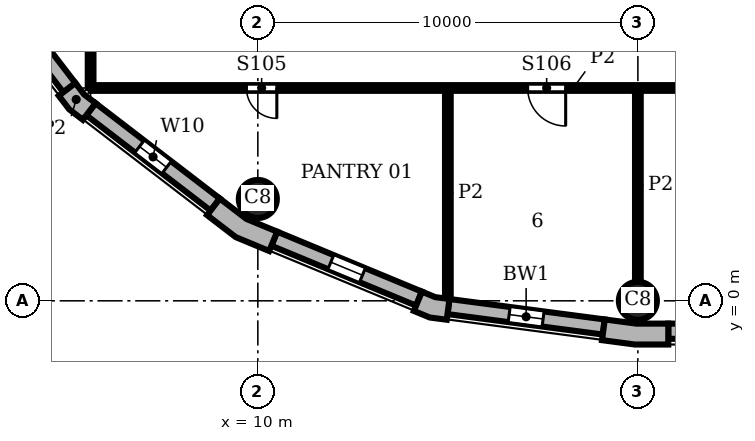
"""IFC4 building model, lengths in metres.
Left out: names, types, materials, properties, quantities, classifications, styles, units other than length and angle.
Written with IfcOpenShell. Run it as: python <this file> out.ifc"""

import sys

from ifc_helpers import new_model, si_unit, direction, frame, frame_2d, origin, origin_2d, place, context, subcontext, project, spatial, polyline, rectangle, circle, outline, extrude, element, fill, save


model = new_model("IFC4")
c1 = context("Model", 3, precision=1e-05, world=origin(), true_north=direction((0.0, 1.0)))
c2 = subcontext(c1, "Body", "Model", "MODEL_VIEW")
j1 = project(units=[si_unit("LENGTHUNIT", "METRE"), si_unit("PLANEANGLEUNIT", "RADIAN")], contexts=[c1])
p1 = place(None, origin())
s1 = spatial("IfcSite", under=j1, at=p1, CompositionType="ELEMENT")
p2 = place(p1, origin())
s2 = spatial("IfcBuilding", under=s1, at=p2, CompositionType="ELEMENT")
p3 = place(p2, frame((0.0, 0.0, 126.3)))
s3 = spatial("IfcBuildingStorey", under=s2, at=p3, CompositionType="ELEMENT", Elevation=126.3)
for number, where, z_axis, x_axis in (
    (1, (20.0, 0.0, 0.0), (0.0, 0.0, 1.0), (1.0, 0.0, 0.0)),
    (2, (10.0, 2.679, 0.0), (0.0, 0.0, 1.0), (1.0, 0.0, 0.0)),
):
    element("IfcColumn", number, at=place(p3, frame(where, z_axis=z_axis, x_axis=x_axis)), inside=s3, PredefinedType="COLUMN", context=c2, shape_type="SweptSolid", body=[
        extrude(circle(Radius=0.5, at=origin_2d()), origin(), (0.0, 0.0, 1.0), 5.4),
    ])
p4 = place(p3, origin())
e3 = element("IfcWall", 3, at=p4, inside=s3, PredefinedType="SOLIDWALL", context=c2, shape_type="SweptSolid", body=[
    extrude(outline(polyline([(19.076, -0.887), (19.057, -1.036), (19.925, -1.15), (20.8, -1.15), (20.8, -1.0), (20.8, -0.6), (19.961, -0.6), (19.128, -0.49), (19.076, -0.887)])), origin(), (0.0, 0.0, 1.0), 5.4),
])
e4 = element("IfcWall", 4, at=p4, inside=s3, PredefinedType="SOLIDWALL", context=c2, shape_type="SweptSolid", body=[
    extrude(outline(polyline([(4.882, 5.487), (4.763, 5.396), (5.038, 5.038), (5.396, 4.763), (5.487, 4.882), (5.731, 5.199), (5.43, 5.43), (5.199, 5.731), (4.882, 5.487)])), origin(), (0.0, 0.0, 1.0), 5.4),
])
e5 = element("IfcWall", 5, at=p4, inside=s3, PredefinedType="SOLIDWALL", context=c2, shape_type="SweptSolid", body=[
    extrude(outline(polyline([(8.757, 2.373), (8.665, 2.254), (9.42, 1.675), (10.299, 1.311), (10.356, 1.449), (10.51, 1.819), (9.698, 2.155), (9.0, 2.69), (8.757, 2.373)])), origin(), (0.0, 0.0, 1.0), 5.4),
])
e6 = element("IfcWall", 6, at=p4, inside=s3, PredefinedType="SOLIDWALL", context=c2, shape_type="SweptSolid", body=[
    extrude(outline(polyline([(14.164, -0.128), (14.106, -0.266), (14.523, -0.439), (14.971, -0.498), (14.99, -0.349), (15.043, 0.047), (14.667, 0.097), (14.317, 0.242), (14.164, -0.128)])), origin(), (0.0, 0.0, 1.0), 5.4),
])
p5 = place(p3, frame((20.8, -0.8, 0.0), z_axis=(0.0, 0.0, 1.0), x_axis=(1.0, 0.0, 0.0)))
e7 = element("IfcWall", 7, at=p5, inside=s3, PredefinedType="SOLIDWALL", context=c2, shape_type="SweptSolid", body=[
    extrude(rectangle(XDim=38.4, YDim=0.4, at=frame_2d((19.2, 0.0))), origin(), (0.0, 0.0, 1.0), 5.4),
])
p6 = place(p5, frame((3.75, 0.0, 0.9)))
e8 = element("IfcOpeningElement", 8, at=p6, cuts=e7, PredefinedType="OPENING", context=c2, shape_type="SweptSolid", body=[
    extrude(rectangle(XDim=0.9, YDim=3.4, at=frame_2d((0.45, 1.7))), frame((0.0, 0.21, 0.0), z_axis=(0.0, -1.0, 0.0), x_axis=(1.0, 0.0, 0.0)), (0.0, 0.0, 1.0), 0.42),
])
p7 = place(p5, frame((13.75, 0.0, 0.9)))
e9 = element("IfcOpeningElement", 9, at=p7, cuts=e7, PredefinedType="OPENING", context=c2, shape_type="SweptSolid", body=[
    extrude(rectangle(XDim=0.9, YDim=3.4, at=frame_2d((0.45, 1.7))), frame((0.0, 0.21, 0.0), z_axis=(0.0, -1.0, 0.0), x_axis=(1.0, 0.0, 0.0)), (0.0, 0.0, 1.0), 0.42),
])
p8 = place(p5, frame((23.75, 0.0, 0.9)))
e10 = element("IfcOpeningElement", 10, at=p8, cuts=e7, PredefinedType="OPENING", context=c2, shape_type="SweptSolid", body=[
    extrude(rectangle(XDim=0.9, YDim=3.4, at=frame_2d((0.45, 1.7))), frame((0.0, 0.21, 0.0), z_axis=(0.0, -1.0, 0.0), x_axis=(1.0, 0.0, 0.0)), (0.0, 0.0, 1.0), 0.42),
])
p9 = place(p5, frame((33.75, 0.0, 0.9)))
e11 = element("IfcOpeningElement", 11, at=p9, cuts=e7, PredefinedType="OPENING", context=c2, shape_type="SweptSolid", body=[
    extrude(rectangle(XDim=0.9, YDim=3.4, at=frame_2d((0.45, 1.7))), frame((0.0, 0.21, 0.0), z_axis=(0.0, -1.0, 0.0), x_axis=(1.0, 0.0, 0.0)), (0.0, 0.0, 1.0), 0.42),
])
p10 = place(p3, frame((2.532, 8.878, 0.0), z_axis=(0.0, 0.0, 1.0), x_axis=(0.608759824817, -0.793354571229, 0.0)))
e12 = element("IfcWall", 12, at=p10, inside=s3, PredefinedType="SOLIDWALL", context=c2, shape_type="SweptSolid", body=[
    extrude(rectangle(XDim=4.121, YDim=0.4, at=frame_2d((2.061, 0.0))), origin(), (0.0, 0.0, 1.0), 5.4),
])
p11 = place(p10, frame((1.611, 0.0, 0.9)))
e13 = element("IfcOpeningElement", 13, at=p11, cuts=e12, PredefinedType="OPENING", context=c2, shape_type="SweptSolid", body=[
    extrude(rectangle(XDim=0.9, YDim=3.4, at=frame_2d((0.45, 1.7))), frame((0.0, 0.21, 0.0), z_axis=(0.0, -1.0, 0.0), x_axis=(1.0, 0.0, 0.0)), (0.0, 0.0, 1.0), 0.42),
])
p12 = place(p3, frame((5.609, 5.041, 0.0), z_axis=(0.0, 0.0, 1.0), x_axis=(0.793354571229, -0.608759824817, 0.0)))
e14 = element("IfcWall", 14, at=p12, inside=s3, PredefinedType="SOLIDWALL", context=c2, shape_type="SweptSolid", body=[
    extrude(rectangle(XDim=4.121, YDim=0.4, at=frame_2d((2.061, 0.0))), origin(), (0.0, 0.0, 1.0), 5.4),
])
p13 = place(p12, frame((1.611, 0.0, 0.9)))
e15 = element("IfcOpeningElement", 15, at=p13, cuts=e14, PredefinedType="OPENING", context=c2, shape_type="SweptSolid", body=[
    extrude(rectangle(XDim=0.9, YDim=3.4, at=frame_2d((0.45, 1.7))), frame((0.0, 0.21, 0.0), z_axis=(0.0, -1.0, 0.0), x_axis=(1.0, 0.0, 0.0)), (0.0, 0.0, 1.0), 0.42),
])
p14 = place(p3, frame((10.433, 1.634, 0.0), z_axis=(0.0, 0.0, 1.0), x_axis=(0.923863744394, -0.382721546029, 0.0)))
e16 = element("IfcWall", 16, at=p14, inside=s3, PredefinedType="SOLIDWALL", context=c2, shape_type="SweptSolid", body=[
    extrude(rectangle(XDim=4.121, YDim=0.4, at=frame_2d((2.061, 0.0))), origin(), (0.0, 0.0, 1.0), 5.4),
])
p15 = place(p14, frame((1.611, 0.0, 0.9)))
e17 = element("IfcOpeningElement", 17, at=p15, cuts=e16, PredefinedType="OPENING", context=c2, shape_type="SweptSolid", body=[
    extrude(rectangle(XDim=0.9, YDim=3.4, at=frame_2d((0.45, 1.7))), frame((0.0, 0.21, 0.0), z_axis=(0.0, -1.0, 0.0), x_axis=(1.0, 0.0, 0.0)), (0.0, 0.0, 1.0), 0.42),
])
p16 = place(p3, frame((15.017, -0.151, 0.0), z_axis=(0.0, 0.0, 1.0), x_axis=(0.991446429508, -0.130514280502, 0.0)))
e18 = element("IfcWall", 18, at=p16, inside=s3, PredefinedType="SOLIDWALL", context=c2, shape_type="SweptSolid", body=[
    extrude(rectangle(XDim=4.121, YDim=0.4, at=frame_2d((2.061, 0.0))), origin(), (0.0, 0.0, 1.0), 5.4),
])
p17 = place(p16, frame((1.611, 0.0, 0.9)))
e19 = element("IfcOpeningElement", 19, at=p17, cuts=e18, PredefinedType="OPENING", context=c2, shape_type="SweptSolid", body=[
    extrude(rectangle(XDim=0.9, YDim=3.4, at=frame_2d((0.45, 1.7))), frame((0.0, 0.21, 0.0), z_axis=(0.0, -1.0, 0.0), x_axis=(1.0, 0.0, 0.0)), (0.0, 0.0, 1.0), 0.42),
])
p18 = place(p3, frame((5.6, 5.6, 0.0), z_axis=(0.0, 0.0, 1.0), x_axis=(0.0, 1.0, 0.0)))
e20 = element("IfcWall", 20, at=p18, inside=s3, PredefinedType="PARTITIONING", context=c2, shape_type="SweptSolid", body=[
    extrude(rectangle(XDim=22.4, YDim=0.15, at=frame_2d((11.2, 0.0))), origin(), (0.0, 0.0, 1.0), 5.08),
])
p19 = place(p18, frame((4.35, 0.0, 0.0)))
e21 = element("IfcOpeningElement", 21, at=p19, cuts=e20, PredefinedType="OPENING", context=c2, shape_type="SweptSolid", body=[
    extrude(rectangle(XDim=1.0, YDim=2.1, at=frame_2d((0.5, 1.05))), frame((0.0, 0.085, 0.0), z_axis=(0.0, -1.0, 0.0), x_axis=(1.0, 0.0, 0.0)), (0.0, 0.0, 1.0), 0.17),
])
p20 = place(p18, frame((11.75, 0.0, 0.0)))
e22 = element("IfcOpeningElement", 22, at=p20, cuts=e20, PredefinedType="OPENING", context=c2, shape_type="SweptSolid", body=[
    extrude(rectangle(XDim=0.8, YDim=2.1, at=frame_2d((0.4, 1.05))), frame((0.0, 0.085, 0.0), z_axis=(0.0, -1.0, 0.0), x_axis=(1.0, 0.0, 0.0)), (0.0, 0.0, 1.0), 0.17),
])
p21 = place(p18, frame((17.0, 0.0, 0.0)))
e23 = element("IfcOpeningElement", 23, at=p21, cuts=e20, PredefinedType="OPENING", context=c2, shape_type="SweptSolid", body=[
    extrude(rectangle(XDim=1.8, YDim=2.1, at=frame_2d((0.9, 1.05))), frame((0.0, 0.085, 0.0), z_axis=(0.0, -1.0, 0.0), x_axis=(1.0, 0.0, 0.0)), (0.0, 0.0, 1.0), 0.17),
])
p22 = place(p3, frame((15.0, 0.063, 0.0), z_axis=(0.0, 0.0, 1.0), x_axis=(0.0, 1.0, 0.0)))
e24 = element("IfcWall", 24, at=p22, inside=s3, PredefinedType="PARTITIONING", context=c2, shape_type="SweptSolid", body=[
    extrude(rectangle(XDim=5.537, YDim=0.15, at=frame_2d((2.769, 0.0))), origin(), (0.0, 0.0, 1.0), 5.08),
])
p23 = place(p3, frame((20.0, 0.5, 0.0), z_axis=(0.0, 0.0, 1.0), x_axis=(0.0, 1.0, 0.0)))
e25 = element("IfcWall", 25, at=p23, inside=s3, PredefinedType="PARTITIONING", context=c2, shape_type="SweptSolid", body=[
    extrude(rectangle(XDim=5.1, YDim=0.15, at=frame_2d((2.55, 0.0))), origin(), (0.0, 0.0, 1.0), 5.08),
])
p24 = place(p3, frame((5.6, 5.6, 0.0), z_axis=(0.0, 0.0, 1.0), x_axis=(1.0, 0.0, 0.0)))
e26 = element("IfcWall", 26, at=p24, inside=s3, PredefinedType="PARTITIONING", context=c2, shape_type="SweptSolid", body=[
    extrude(rectangle(XDim=25.4, YDim=0.15, at=frame_2d((12.7, 0.0))), origin(), (0.0, 0.0, 1.0), 5.08),
])
p25 = place(p24, frame((4.1, 0.0, 0.0)))
e27 = element("IfcOpeningElement", 27, at=p25, cuts=e26, PredefinedType="OPENING", context=c2, shape_type="SweptSolid", body=[
    extrude(rectangle(XDim=0.8, YDim=2.1, at=frame_2d((0.4, 1.05))), frame((0.0, 0.085, 0.0), z_axis=(0.0, -1.0, 0.0), x_axis=(1.0, 0.0, 0.0)), (0.0, 0.0, 1.0), 0.17),
])
p26 = place(p24, frame((11.5, 0.0, 0.0)))
e28 = element("IfcOpeningElement", 28, at=p26, cuts=e26, PredefinedType="OPENING", context=c2, shape_type="SweptSolid", body=[
    extrude(rectangle(XDim=1.0, YDim=2.1, at=frame_2d((0.5, 1.05))), frame((0.0, 0.085, 0.0), z_axis=(0.0, -1.0, 0.0), x_axis=(1.0, 0.0, 0.0)), (0.0, 0.0, 1.0), 0.17),
])
p27 = place(p13, origin())
e29 = element("IfcWindow", 29, at=p27, inside=s3, PartitioningType="SINGLE_PANEL", PredefinedType="WINDOW", context=c2, shape_type="SweptSolid", body=[
    extrude(rectangle(XDim=0.9, YDim=3.4, at=frame_2d((0.45, 1.7))), frame((0.0, 0.16, 0.0), z_axis=(0.0, -1.0, 0.0), x_axis=(1.0, 0.0, 0.0)), (0.0, 0.0, 1.0), 0.06),
])
fill(e15, e29)
p28 = place(p15, origin())
e30 = element("IfcWindow", 30, at=p28, inside=s3, PartitioningType="SINGLE_PANEL", PredefinedType="WINDOW", context=c2, shape_type="SweptSolid", body=[
    extrude(rectangle(XDim=0.9, YDim=3.4, at=frame_2d((0.45, 1.7))), frame((0.0, 0.16, 0.0), z_axis=(0.0, -1.0, 0.0), x_axis=(1.0, 0.0, 0.0)), (0.0, 0.0, 1.0), 0.06),
])
fill(e17, e30)
p29 = place(p17, origin())
e31 = element("IfcWindow", 31, at=p29, inside=s3, PartitioningType="SINGLE_PANEL", PredefinedType="WINDOW", context=c2, shape_type="SweptSolid", body=[
    extrude(rectangle(XDim=0.9, YDim=3.4, at=frame_2d((0.45, 1.7))), frame((0.0, 0.16, 0.0), z_axis=(0.0, -1.0, 0.0), x_axis=(1.0, 0.0, 0.0)), (0.0, 0.0, 1.0), 0.06),
])
fill(e19, e31)
p30 = place(p25, frame((0.8, 0.0, 0.0), z_axis=(0.0, 0.0, 1.0), x_axis=(-1.0, 0.0, 0.0)))
e32 = element("IfcDoor", 32, at=p30, inside=s3, OperationType="SINGLE_SWING_LEFT", PredefinedType="DOOR", context=c2, shape_type="SweptSolid", body=[
    extrude(rectangle(XDim=0.8, YDim=2.1, at=frame_2d((0.4, 1.05))), frame((0.0, 0.025, 0.0), z_axis=(0.0, -1.0, 0.0), x_axis=(1.0, 0.0, 0.0)), (0.0, 0.0, 1.0), 0.05),
])
fill(e27, e32)
p31 = place(p26, frame((1.0, 0.0, 0.0), z_axis=(0.0, 0.0, 1.0), x_axis=(-1.0, 0.0, 0.0)))
e33 = element("IfcDoor", 33, at=p31, inside=s3, OperationType="SINGLE_SWING_LEFT", PredefinedType="DOOR", context=c2, shape_type="SweptSolid", body=[
    extrude(rectangle(XDim=1.0, YDim=2.1, at=frame_2d((0.5, 1.05))), frame((0.0, 0.025, 0.0), z_axis=(0.0, -1.0, 0.0), x_axis=(1.0, 0.0, 0.0)), (0.0, 0.0, 1.0), 0.05),
])
fill(e28, e33)
save(model, sys.argv[1])
